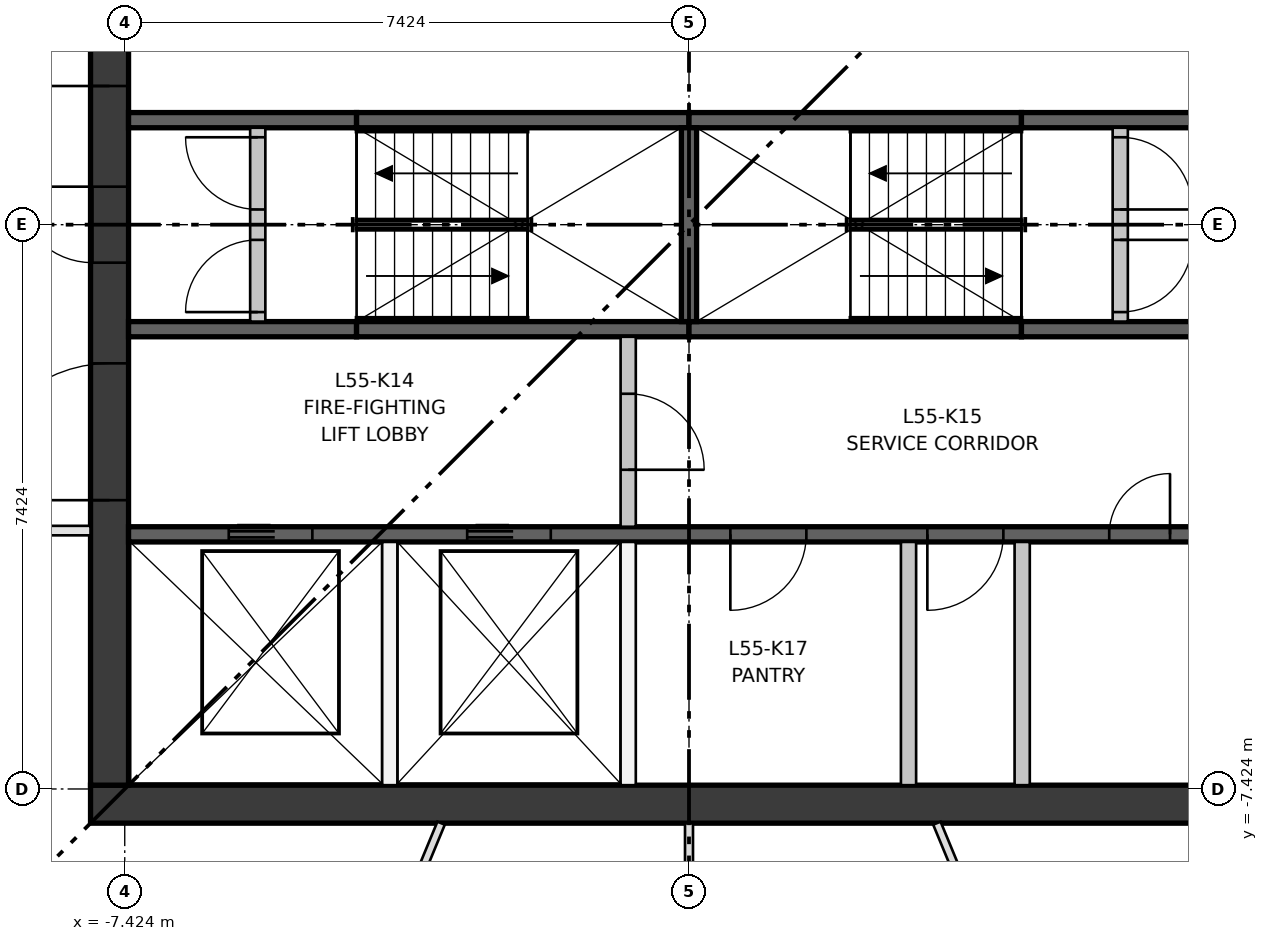
"""IFC4 building model, lengths in metres.
Left out: names, types, materials, properties, quantities, classifications, styles, units other than length and angle.
Written with IfcOpenShell. Run it as: python <this file> out.ifc"""

import sys

from ifc_helpers import new_model, si_unit, direction, frame, frame_2d, origin, place, context, subcontext, project, spatial, rectangle, extrude, element, fill, save


model = new_model("IFC4")
c1 = context("Model", 3, precision=1e-05, world=origin(), true_north=direction((0.0, 1.0)))
c2 = subcontext(c1, "Body", "Model", "MODEL_VIEW")
j1 = project(units=[si_unit("LENGTHUNIT", "METRE"), si_unit("PLANEANGLEUNIT", "RADIAN")], contexts=[c1])
p1 = place(None, origin())
s1 = spatial("IfcSite", under=j1, at=p1, CompositionType="ELEMENT")
p2 = place(p1, origin())
s2 = spatial("IfcBuilding", under=s1, at=p2, CompositionType="ELEMENT")
p3 = place(p2, frame((0.0, 0.0, 204.4)))
s3 = spatial("IfcBuildingStorey", under=s2, at=p3, CompositionType="ELEMENT", Elevation=204.4)
p4 = place(p3, frame((-7.874, -7.624, 0.0), z_axis=(0.0, 0.0, 1.0), x_axis=(1.0, 0.0, 0.0)))
e1 = element("IfcWall", 1, at=p4, inside=s3, PredefinedType="SHEAR", context=c2, shape_type="SweptSolid", body=[
    extrude(rectangle(XDim=15.748, YDim=0.5, at=frame_2d((7.874, 0.0))), origin(), (0.0, 0.0, 1.0), 3.35),
])
p5 = place(p3, frame((-7.624, -7.374, 0.0), z_axis=(0.0, 0.0, 1.0), x_axis=(0.0, 1.0, 0.0)))
e2 = element("IfcWall", 2, at=p5, inside=s3, PredefinedType="SHEAR", context=c2, shape_type="SweptSolid", body=[
    extrude(rectangle(XDim=14.748, YDim=0.5, at=frame_2d((7.374, 0.0))), origin(), (0.0, 0.0, 1.0), 3.35),
])
p6 = place(p5, frame((6.874, 0.0, 0.0)))
e3 = element("IfcOpeningElement", 3, at=p6, cuts=e2, PredefinedType="OPENING", context=c2, shape_type="SweptSolid", body=[
    extrude(rectangle(XDim=1.0, YDim=2.1, at=frame_2d((0.5, 1.05))), frame((0.0, 0.26, 0.0), z_axis=(0.0, -1.0, 0.0), x_axis=(1.0, 0.0, 0.0)), (0.0, 0.0, 1.0), 0.52),
])
p7 = place(p5, frame((3.75, 0.0, 0.0)))
e4 = element("IfcOpeningElement", 4, at=p7, cuts=e2, PredefinedType="OPENING", context=c2, shape_type="SweptSolid", body=[
    extrude(rectangle(XDim=1.8, YDim=2.1, at=frame_2d((0.9, 1.05))), frame((0.0, 0.26, 0.0), z_axis=(0.0, -1.0, 0.0), x_axis=(1.0, 0.0, 0.0)), (0.0, 0.0, 1.0), 0.52),
])
p8 = place(p5, frame((9.198, 0.0, 0.0)))
e5 = element("IfcOpeningElement", 5, at=p8, cuts=e2, PredefinedType="OPENING", context=c2, shape_type="SweptSolid", body=[
    extrude(rectangle(XDim=1.8, YDim=2.1, at=frame_2d((0.9, 1.05))), frame((0.0, 0.26, 0.0), z_axis=(0.0, -1.0, 0.0), x_axis=(1.0, 0.0, 0.0)), (0.0, 0.0, 1.0), 0.52),
])
p9 = place(p3, frame((-7.374, -4.074, 0.0), z_axis=(0.0, 0.0, 1.0), x_axis=(1.0, 0.0, 0.0)))
e6 = element("IfcWall", 6, at=p9, inside=s3, PredefinedType="SHEAR", context=c2, shape_type="SweptSolid", body=[
    extrude(rectangle(XDim=14.748, YDim=0.2, at=frame_2d((7.374, 0.0))), origin(), (0.0, 0.0, 1.0), 3.0),
])
p10 = place(p9, frame((1.319, 0.0, 0.0)))
e7 = element("IfcOpeningElement", 7, at=p10, cuts=e6, PredefinedType="OPENING", context=c2, shape_type="SweptSolid", body=[
    extrude(rectangle(XDim=1.1, YDim=2.1, at=frame_2d((0.55, 1.05))), frame((0.0, 0.11, 0.0), z_axis=(0.0, -1.0, 0.0), x_axis=(1.0, 0.0, 0.0)), (0.0, 0.0, 1.0), 0.22),
])
p11 = place(p9, frame((4.456, 0.0, 0.0)))
e8 = element("IfcOpeningElement", 8, at=p11, cuts=e6, PredefinedType="OPENING", context=c2, shape_type="SweptSolid", body=[
    extrude(rectangle(XDim=1.1, YDim=2.1, at=frame_2d((0.55, 1.05))), frame((0.0, 0.11, 0.0), z_axis=(0.0, -1.0, 0.0), x_axis=(1.0, 0.0, 0.0)), (0.0, 0.0, 1.0), 0.22),
])
p12 = place(p9, frame((7.918, 0.0, 0.0)))
e9 = element("IfcOpeningElement", 9, at=p12, cuts=e6, PredefinedType="OPENING", context=c2, shape_type="SweptSolid", body=[
    extrude(rectangle(XDim=1.0, YDim=2.1, at=frame_2d((0.5, 1.05))), frame((0.0, 0.11, 0.0), z_axis=(0.0, -1.0, 0.0), x_axis=(1.0, 0.0, 0.0)), (0.0, 0.0, 1.0), 0.22),
])
p13 = place(p9, frame((10.51, 0.0, 0.0)))
e10 = element("IfcOpeningElement", 10, at=p13, cuts=e6, PredefinedType="OPENING", context=c2, shape_type="SweptSolid", body=[
    extrude(rectangle(XDim=1.0, YDim=2.1, at=frame_2d((0.5, 1.05))), frame((0.0, 0.11, 0.0), z_axis=(0.0, -1.0, 0.0), x_axis=(1.0, 0.0, 0.0)), (0.0, 0.0, 1.0), 0.22),
])
p14 = place(p9, frame((12.903, 0.0, 0.0)))
e11 = element("IfcOpeningElement", 11, at=p14, cuts=e6, PredefinedType="OPENING", context=c2, shape_type="SweptSolid", body=[
    extrude(rectangle(XDim=0.8, YDim=2.1, at=frame_2d((0.4, 1.05))), frame((0.0, 0.11, 0.0), z_axis=(0.0, -1.0, 0.0), x_axis=(1.0, 0.0, 0.0)), (0.0, 0.0, 1.0), 0.22),
])
p15 = place(p3, frame((-7.374, -1.375, 0.0), z_axis=(0.0, 0.0, 1.0), x_axis=(1.0, 0.0, 0.0)))
e12 = element("IfcWall", 12, at=p15, inside=s3, PredefinedType="SHEAR", context=c2, shape_type="SweptSolid", body=[
    extrude(rectangle(XDim=3.0, YDim=0.2, at=frame_2d((1.5, 0.0))), origin(), (0.0, 0.0, 1.0), 3.0),
])
for number, where, z_axis, x_axis in (
    (13, (-4.374, -1.375, 0.0), (0.0, 0.0, 1.0), (1.0, 0.0, 0.0)),
    (14, (0.0, -1.375, 0.0), (0.0, 0.0, 1.0), (1.0, 0.0, 0.0)),
):
    element("IfcWall", number, at=place(p3, frame(where, z_axis=z_axis, x_axis=x_axis)), inside=s3, PredefinedType="SHEAR", context=c2, shape_type="SweptSolid", body=[
        extrude(rectangle(XDim=4.374, YDim=0.2, at=frame_2d((2.187, 0.0))), origin(), (0.0, 0.0, 1.0), 3.0),
    ])
for number, where, z_axis, x_axis in (
    (15, (4.374, -1.375, 0.0), (0.0, 0.0, 1.0), (1.0, 0.0, 0.0)),
    (16, (-7.374, 1.375, 0.0), (0.0, 0.0, 1.0), (1.0, 0.0, 0.0)),
):
    element("IfcWall", number, at=place(p3, frame(where, z_axis=z_axis, x_axis=x_axis)), inside=s3, PredefinedType="SHEAR", context=c2, shape_type="SweptSolid", body=[
        extrude(rectangle(XDim=3.0, YDim=0.2, at=frame_2d((1.5, 0.0))), origin(), (0.0, 0.0, 1.0), 3.0),
    ])
for number, where, z_axis, x_axis in (
    (17, (-4.374, 1.375, 0.0), (0.0, 0.0, 1.0), (1.0, 0.0, 0.0)),
    (18, (0.0, 1.375, 0.0), (0.0, 0.0, 1.0), (1.0, 0.0, 0.0)),
):
    element("IfcWall", number, at=place(p3, frame(where, z_axis=z_axis, x_axis=x_axis)), inside=s3, PredefinedType="SHEAR", context=c2, shape_type="SweptSolid", body=[
        extrude(rectangle(XDim=4.374, YDim=0.2, at=frame_2d((2.187, 0.0))), origin(), (0.0, 0.0, 1.0), 3.0),
    ])
p16 = place(p3, frame((4.374, 1.375, 0.0), z_axis=(0.0, 0.0, 1.0), x_axis=(1.0, 0.0, 0.0)))
e19 = element("IfcWall", 19, at=p16, inside=s3, PredefinedType="SHEAR", context=c2, shape_type="SweptSolid", body=[
    extrude(rectangle(XDim=3.0, YDim=0.2, at=frame_2d((1.5, 0.0))), origin(), (0.0, 0.0, 1.0), 3.0),
])
p17 = place(p3, frame((0.0, -1.275, 0.0), z_axis=(0.0, 0.0, 1.0), x_axis=(0.0, 1.0, 0.0)))
e20 = element("IfcWall", 20, at=p17, inside=s3, PredefinedType="SHEAR", context=c2, shape_type="SweptSolid", body=[
    extrude(rectangle(XDim=2.55, YDim=0.2, at=frame_2d((1.275, 0.0))), origin(), (0.0, 0.0, 1.0), 3.0),
])
for number, where, z_axis, x_axis in (
    (21, (-3.937, -7.374, 0.0), (0.0, 0.0, 1.0), (0.0, 1.0, 0.0)),
    (22, (-0.8, -7.374, 0.0), (0.0, 0.0, 1.0), (0.0, 1.0, 0.0)),
):
    element("IfcWall", number, at=place(p3, frame(where, z_axis=z_axis, x_axis=x_axis)), inside=s3, PredefinedType="PARTITIONING", context=c2, shape_type="SweptSolid", body=[
        extrude(rectangle(XDim=3.2, YDim=0.2, at=frame_2d((1.6, 0.0))), origin(), (0.0, 0.0, 1.0), 3.0),
    ])
p18 = place(p3, frame((-0.8, -3.974, 0.0), z_axis=(0.0, 0.0, 1.0), x_axis=(0.0, 1.0, 0.0)))
e23 = element("IfcWall", 23, at=p18, inside=s3, PredefinedType="PARTITIONING", context=c2, shape_type="SweptSolid", body=[
    extrude(rectangle(XDim=2.499, YDim=0.2, at=frame_2d((1.25, 0.0))), origin(), (0.0, 0.0, 1.0), 3.0),
])
p19 = place(p18, frame((0.75, 0.0, 0.0)))
e24 = element("IfcOpeningElement", 24, at=p19, cuts=e23, PredefinedType="OPENING", context=c2, shape_type="SweptSolid", body=[
    extrude(rectangle(XDim=1.0, YDim=2.1, at=frame_2d((0.5, 1.05))), frame((0.0, 0.11, 0.0), z_axis=(0.0, -1.0, 0.0), x_axis=(1.0, 0.0, 0.0)), (0.0, 0.0, 1.0), 0.22),
])
for number, where, z_axis, x_axis in (
    (25, (2.888, -7.374, 0.0), (0.0, 0.0, 1.0), (0.0, 1.0, 0.0)),
    (26, (4.384, -7.374, 0.0), (0.0, 0.0, 1.0), (0.0, 1.0, 0.0)),
):
    element("IfcWall", number, at=place(p3, frame(where, z_axis=z_axis, x_axis=x_axis)), inside=s3, PredefinedType="PARTITIONING", context=c2, shape_type="SweptSolid", body=[
        extrude(rectangle(XDim=3.2, YDim=0.2, at=frame_2d((1.6, 0.0))), origin(), (0.0, 0.0, 1.0), 3.0),
    ])
p20 = place(p3, frame((-5.674, -1.275, 0.0), z_axis=(0.0, 0.0, 1.0), x_axis=(0.0, 1.0, 0.0)))
e27 = element("IfcWall", 27, at=p20, inside=s3, PredefinedType="PARTITIONING", context=c2, shape_type="SweptSolid", body=[
    extrude(rectangle(XDim=2.55, YDim=0.2, at=frame_2d((1.275, 0.0))), origin(), (0.0, 0.0, 1.0), 3.0),
])
p21 = place(p20, frame((0.125, 0.0, 0.0)))
e28 = element("IfcOpeningElement", 28, at=p21, cuts=e27, PredefinedType="OPENING", context=c2, shape_type="SweptSolid", body=[
    extrude(rectangle(XDim=0.95, YDim=2.1, at=frame_2d((0.475, 1.05))), frame((0.0, 0.11, 0.0), z_axis=(0.0, -1.0, 0.0), x_axis=(1.0, 0.0, 0.0)), (0.0, 0.0, 1.0), 0.22),
])
p22 = place(p20, frame((1.475, 0.0, 0.0)))
e29 = element("IfcOpeningElement", 29, at=p22, cuts=e27, PredefinedType="OPENING", context=c2, shape_type="SweptSolid", body=[
    extrude(rectangle(XDim=0.95, YDim=2.1, at=frame_2d((0.475, 1.05))), frame((0.0, 0.11, 0.0), z_axis=(0.0, -1.0, 0.0), x_axis=(1.0, 0.0, 0.0)), (0.0, 0.0, 1.0), 0.22),
])
p23 = place(p3, frame((5.674, -1.275, 0.0), z_axis=(0.0, 0.0, 1.0), x_axis=(0.0, 1.0, 0.0)))
e30 = element("IfcWall", 30, at=p23, inside=s3, PredefinedType="PARTITIONING", context=c2, shape_type="SweptSolid", body=[
    extrude(rectangle(XDim=2.55, YDim=0.2, at=frame_2d((1.275, 0.0))), origin(), (0.0, 0.0, 1.0), 3.0),
])
p24 = place(p23, frame((0.125, 0.0, 0.0)))
e31 = element("IfcOpeningElement", 31, at=p24, cuts=e30, PredefinedType="OPENING", context=c2, shape_type="SweptSolid", body=[
    extrude(rectangle(XDim=0.95, YDim=2.1, at=frame_2d((0.475, 1.05))), frame((0.0, 0.11, 0.0), z_axis=(0.0, -1.0, 0.0), x_axis=(1.0, 0.0, 0.0)), (0.0, 0.0, 1.0), 0.22),
])
p25 = place(p23, frame((1.475, 0.0, 0.0)))
e32 = element("IfcOpeningElement", 32, at=p25, cuts=e30, PredefinedType="OPENING", context=c2, shape_type="SweptSolid", body=[
    extrude(rectangle(XDim=0.95, YDim=2.1, at=frame_2d((0.475, 1.05))), frame((0.0, 0.11, 0.0), z_axis=(0.0, -1.0, 0.0), x_axis=(1.0, 0.0, 0.0)), (0.0, 0.0, 1.0), 0.22),
])
p26 = place(p3, frame((-7.874, -4.024, 0.0), z_axis=(0.0, 0.0, 1.0), x_axis=(-1.0, 0.0, 0.0)))
e33 = element("IfcWall", 33, at=p26, inside=s3, PredefinedType="PARTITIONING", context=c2, shape_type="SweptSolid", body=[
    extrude(rectangle(XDim=4.951, YDim=0.125, at=frame_2d((2.476, 0.0))), origin(), (0.0, 0.0, 1.0), 3.0),
])
p27 = place(p26, frame((2.0, 0.0, 0.0)))
e34 = element("IfcOpeningElement", 34, at=p27, cuts=e33, PredefinedType="OPENING", context=c2, shape_type="SweptSolid", body=[
    extrude(rectangle(XDim=1.0, YDim=2.1, at=frame_2d((0.5, 1.05))), frame((0.0, 0.073, 0.0), z_axis=(0.0, -1.0, 0.0), x_axis=(1.0, 0.0, 0.0)), (0.0, 0.0, 1.0), 0.145),
])
p28 = place(p3, frame((-3.261, -7.874, 0.0), z_axis=(0.0, 0.0, 1.0), x_axis=(-0.38271544888, -0.923866270186, 0.0)))
e35 = element("IfcWall", 35, at=p28, inside=s3, PredefinedType="PARTITIONING", context=c2, shape_type="SweptSolid", body=[
    extrude(rectangle(XDim=4.427, YDim=0.105, at=frame_2d((2.214, 0.0))), origin(), (0.0, 0.0, 1.0), 3.0),
])
p29 = place(p28, frame((1.7, 0.0, 0.0)))
e36 = element("IfcOpeningElement", 36, at=p29, cuts=e35, PredefinedType="OPENING", context=c2, shape_type="SweptSolid", body=[
    extrude(rectangle(XDim=1.0, YDim=2.1, at=frame_2d((0.5, 1.05))), frame((0.0, 0.062, 0.0), z_axis=(0.0, -1.0, 0.0), x_axis=(1.0, 0.0, 0.0)), (0.0, 0.0, 1.0), 0.125),
])
p30 = place(p3, frame((0.0, -7.874, 0.0), z_axis=(0.0, 0.0, 1.0), x_axis=(0.0, -1.0, 0.0)))
e37 = element("IfcWall", 37, at=p30, inside=s3, PredefinedType="PARTITIONING", context=c2, shape_type="SweptSolid", body=[
    extrude(rectangle(XDim=5.076, YDim=0.105, at=frame_2d((2.538, 0.0))), origin(), (0.0, 0.0, 1.0), 3.0),
])
p31 = place(p3, frame((4.956, -11.964, 0.0), z_axis=(0.0, 0.0, 1.0), x_axis=(-0.38271544888, 0.923866270186, 0.0)))
e38 = element("IfcWall", 38, at=p31, inside=s3, PredefinedType="PARTITIONING", context=c2, shape_type="SweptSolid", body=[
    extrude(rectangle(XDim=4.427, YDim=0.105, at=frame_2d((2.214, 0.0))), origin(), (0.0, 0.0, 1.0), 3.0),
])
p32 = place(p31, frame((1.7, 0.0, 0.0)))
e39 = element("IfcOpeningElement", 39, at=p32, cuts=e38, PredefinedType="OPENING", context=c2, shape_type="SweptSolid", body=[
    extrude(rectangle(XDim=1.0, YDim=2.1, at=frame_2d((0.5, 1.05))), frame((0.0, 0.062, 0.0), z_axis=(0.0, -1.0, 0.0), x_axis=(1.0, 0.0, 0.0)), (0.0, 0.0, 1.0), 0.125),
])
p33 = place(p10, origin())
e40 = element("IfcDoor", 40, at=p33, inside=s3, OperationType="DOUBLE_DOOR_SLIDING", PredefinedType="DOOR", context=c2, shape_type="SweptSolid", body=[
    extrude(rectangle(XDim=1.1, YDim=2.1, at=frame_2d((0.55, 1.05))), frame((0.0, 0.025, 0.0), z_axis=(0.0, -1.0, 0.0), x_axis=(1.0, 0.0, 0.0)), (0.0, 0.0, 1.0), 0.05),
])
fill(e7, e40)
p34 = place(p11, origin())
e41 = element("IfcDoor", 41, at=p34, inside=s3, OperationType="DOUBLE_DOOR_SLIDING", PredefinedType="DOOR", context=c2, shape_type="SweptSolid", body=[
    extrude(rectangle(XDim=1.1, YDim=2.1, at=frame_2d((0.55, 1.05))), frame((0.0, 0.025, 0.0), z_axis=(0.0, -1.0, 0.0), x_axis=(1.0, 0.0, 0.0)), (0.0, 0.0, 1.0), 0.05),
])
fill(e8, e41)
p35 = place(p21, origin())
e42 = element("IfcDoor", 42, at=p35, inside=s3, OperationType="SINGLE_SWING_LEFT", PredefinedType="DOOR", context=c2, shape_type="SweptSolid", body=[
    extrude(rectangle(XDim=0.95, YDim=2.1, at=frame_2d((0.475, 1.05))), frame((0.0, 0.025, 0.0), z_axis=(0.0, -1.0, 0.0), x_axis=(1.0, 0.0, 0.0)), (0.0, 0.0, 1.0), 0.05),
])
fill(e28, e42)
p36 = place(p22, origin())
e43 = element("IfcDoor", 43, at=p36, inside=s3, OperationType="SINGLE_SWING_RIGHT", PredefinedType="DOOR", context=c2, shape_type="SweptSolid", body=[
    extrude(rectangle(XDim=0.95, YDim=2.1, at=frame_2d((0.475, 1.05))), frame((0.0, 0.025, 0.0), z_axis=(0.0, -1.0, 0.0), x_axis=(1.0, 0.0, 0.0)), (0.0, 0.0, 1.0), 0.05),
])
fill(e29, e43)
p37 = place(p24, frame((0.95, 0.0, 0.0), z_axis=(0.0, 0.0, 1.0), x_axis=(-1.0, 0.0, 0.0)))
e44 = element("IfcDoor", 44, at=p37, inside=s3, OperationType="SINGLE_SWING_RIGHT", PredefinedType="DOOR", context=c2, shape_type="SweptSolid", body=[
    extrude(rectangle(XDim=0.95, YDim=2.1, at=frame_2d((0.475, 1.05))), frame((0.0, 0.025, 0.0), z_axis=(0.0, -1.0, 0.0), x_axis=(1.0, 0.0, 0.0)), (0.0, 0.0, 1.0), 0.05),
])
fill(e31, e44)
p38 = place(p25, frame((0.95, 0.0, 0.0), z_axis=(0.0, 0.0, 1.0), x_axis=(-1.0, 0.0, 0.0)))
e45 = element("IfcDoor", 45, at=p38, inside=s3, OperationType="SINGLE_SWING_LEFT", PredefinedType="DOOR", context=c2, shape_type="SweptSolid", body=[
    extrude(rectangle(XDim=0.95, YDim=2.1, at=frame_2d((0.475, 1.05))), frame((0.0, 0.025, 0.0), z_axis=(0.0, -1.0, 0.0), x_axis=(1.0, 0.0, 0.0)), (0.0, 0.0, 1.0), 0.05),
])
fill(e32, e45)
p39 = place(p19, frame((1.0, 0.0, 0.0), z_axis=(0.0, 0.0, 1.0), x_axis=(-1.0, 0.0, 0.0)))
e46 = element("IfcDoor", 46, at=p39, inside=s3, OperationType="SINGLE_SWING_LEFT", PredefinedType="DOOR", context=c2, shape_type="SweptSolid", body=[
    extrude(rectangle(XDim=1.0, YDim=2.1, at=frame_2d((0.5, 1.05))), frame((0.0, 0.025, 0.0), z_axis=(0.0, -1.0, 0.0), x_axis=(1.0, 0.0, 0.0)), (0.0, 0.0, 1.0), 0.05),
])
fill(e24, e46)
p40 = place(p12, frame((1.0, 0.0, 0.0), z_axis=(0.0, 0.0, 1.0), x_axis=(-1.0, 0.0, 0.0)))
e47 = element("IfcDoor", 47, at=p40, inside=s3, OperationType="SINGLE_SWING_LEFT", PredefinedType="DOOR", context=c2, shape_type="SweptSolid", body=[
    extrude(rectangle(XDim=1.0, YDim=2.1, at=frame_2d((0.5, 1.05))), frame((0.0, 0.025, 0.0), z_axis=(0.0, -1.0, 0.0), x_axis=(1.0, 0.0, 0.0)), (0.0, 0.0, 1.0), 0.05),
])
fill(e9, e47)
p41 = place(p13, frame((1.0, 0.0, 0.0), z_axis=(0.0, 0.0, 1.0), x_axis=(-1.0, 0.0, 0.0)))
e48 = element("IfcDoor", 48, at=p41, inside=s3, OperationType="SINGLE_SWING_LEFT", PredefinedType="DOOR", context=c2, shape_type="SweptSolid", body=[
    extrude(rectangle(XDim=1.0, YDim=2.1, at=frame_2d((0.5, 1.05))), frame((0.0, 0.025, 0.0), z_axis=(0.0, -1.0, 0.0), x_axis=(1.0, 0.0, 0.0)), (0.0, 0.0, 1.0), 0.05),
])
fill(e10, e48)
p42 = place(p14, origin())
e49 = element("IfcDoor", 49, at=p42, inside=s3, OperationType="SINGLE_SWING_RIGHT", PredefinedType="DOOR", context=c2, shape_type="SweptSolid", body=[
    extrude(rectangle(XDim=0.8, YDim=2.1, at=frame_2d((0.4, 1.05))), frame((0.0, 0.025, 0.0), z_axis=(0.0, -1.0, 0.0), x_axis=(1.0, 0.0, 0.0)), (0.0, 0.0, 1.0), 0.05),
])
fill(e11, e49)
p43 = place(p6, origin())
e50 = element("IfcDoor", 50, at=p43, inside=s3, OperationType="SINGLE_SWING_RIGHT", PredefinedType="DOOR", context=c2, shape_type="SweptSolid", body=[
    extrude(rectangle(XDim=1.0, YDim=2.1, at=frame_2d((0.5, 1.05))), frame((0.0, 0.25, 0.0), z_axis=(0.0, -1.0, 0.0), x_axis=(1.0, 0.0, 0.0)), (0.0, 0.0, 1.0), 0.05),
])
fill(e3, e50)
p44 = place(p7, origin())
e51 = element("IfcDoor", 51, at=p44, inside=s3, OperationType="DOUBLE_DOOR_SINGLE_SWING", PredefinedType="DOOR", context=c2, shape_type="SweptSolid", body=[
    extrude(rectangle(XDim=1.8, YDim=2.1, at=frame_2d((0.9, 1.05))), frame((0.0, 0.025, 0.0), z_axis=(0.0, -1.0, 0.0), x_axis=(1.0, 0.0, 0.0)), (0.0, 0.0, 1.0), 0.05),
])
fill(e4, e51)
p45 = place(p8, origin())
e52 = element("IfcDoor", 52, at=p45, inside=s3, OperationType="DOUBLE_DOOR_SINGLE_SWING", PredefinedType="DOOR", context=c2, shape_type="SweptSolid", body=[
    extrude(rectangle(XDim=1.8, YDim=2.1, at=frame_2d((0.9, 1.05))), frame((0.0, 0.025, 0.0), z_axis=(0.0, -1.0, 0.0), x_axis=(1.0, 0.0, 0.0)), (0.0, 0.0, 1.0), 0.05),
])
fill(e5, e52)
save(model, sys.argv[1])
